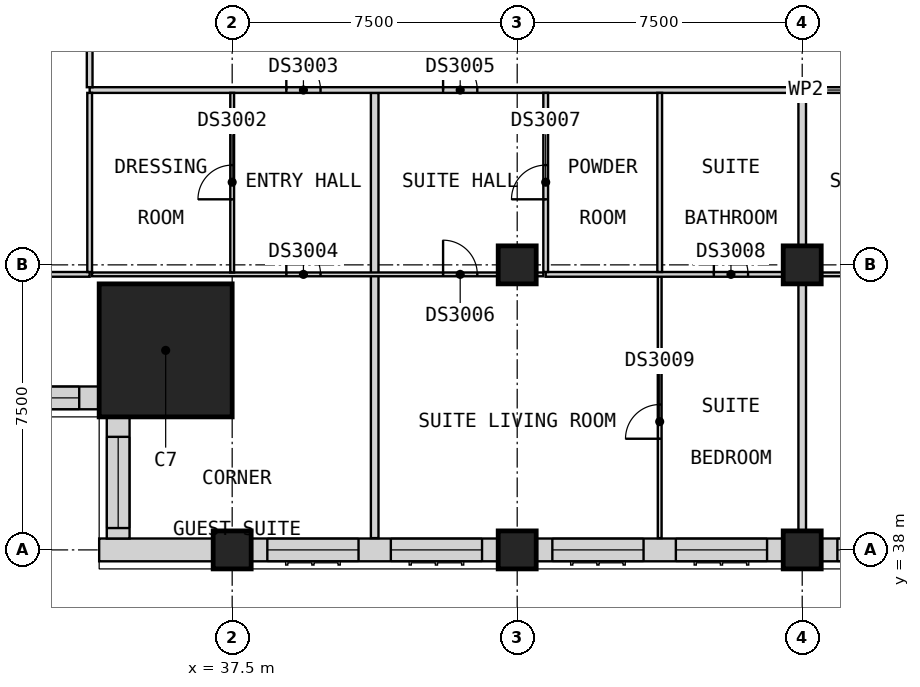
"""IFC4 building model, lengths in metres.
Left out: names, types, materials, properties, quantities, classifications, styles, units other than length and angle.
Written with IfcOpenShell. Run it as: python <this file> out.ifc"""

import sys

from ifc_helpers import new_model, si_unit, direction, frame, frame_2d, origin, origin_2d, place, context, subcontext, project, spatial, rectangle, extrude, element, fill, save


model = new_model("IFC4")
c1 = context("Model", 3, precision=1e-05, world=origin(), true_north=direction((0.0, 1.0)))
c2 = subcontext(c1, "Body", "Model", "MODEL_VIEW")
j1 = project(units=[si_unit("LENGTHUNIT", "METRE"), si_unit("PLANEANGLEUNIT", "RADIAN")], contexts=[c1])
p1 = place(None, origin())
s1 = spatial("IfcSite", under=j1, at=p1, CompositionType="ELEMENT")
p2 = place(p1, origin())
s2 = spatial("IfcBuilding", under=s1, at=p2, CompositionType="ELEMENT")
p3 = place(p2, frame((0.0, 0.0, 137.4)))
s3 = spatial("IfcBuildingStorey", under=s2, at=p3, CompositionType="ELEMENT", Elevation=137.4)
for number, where, z_axis, x_axis in (
    (1, (37.5, 38.0, 0.0), (0.0, 0.0, 1.0), (1.0, 0.0, 0.0)),
    (2, (45.0, 38.0, 0.0), (0.0, 0.0, 1.0), (1.0, 0.0, 0.0)),
    (3, (45.0, 45.5, 0.0), (0.0, 0.0, 1.0), (1.0, 0.0, 0.0)),
    (4, (52.5, 38.0, 0.0), (0.0, 0.0, 1.0), (1.0, 0.0, 0.0)),
    (5, (52.5, 45.5, 0.0), (0.0, 0.0, 1.0), (1.0, 0.0, 0.0)),
):
    element("IfcColumn", number, at=place(p3, frame(where, z_axis=z_axis, x_axis=x_axis)), inside=s3, PredefinedType="COLUMN", context=c2, shape_type="SweptSolid", body=[
        extrude(rectangle(XDim=1.0, YDim=1.0, at=origin_2d()), origin(), (0.0, 0.0, 1.0), 3.6),
    ])
p4 = place(p3, frame((35.75, 43.25, 0.0), z_axis=(0.0, 0.0, 1.0), x_axis=(1.0, 0.0, 0.0)))
e6 = element("IfcColumn", 6, at=p4, inside=s3, PredefinedType="COLUMN", context=c2, shape_type="SweptSolid", body=[
    extrude(rectangle(XDim=3.5, YDim=3.5, at=origin_2d()), origin(), (0.0, 0.0, 1.0), 3.6),
])
p5 = place(p3, frame((34.0, 38.0, 0.0), z_axis=(0.0, 0.0, 1.0), x_axis=(1.0, 0.0, 0.0)))
e7 = element("IfcWall", 7, at=p5, inside=s3, PredefinedType="SOLIDWALL", context=c2, shape_type="SweptSolid", body=[
    extrude(rectangle(XDim=3.0, YDim=0.6, at=frame_2d((1.5, 0.0))), origin(), (0.0, 0.0, 1.0), 3.35),
])
p6 = place(p3, frame((38.0, 38.0, 0.0), z_axis=(0.0, 0.0, 1.0), x_axis=(1.0, 0.0, 0.0)))
e8 = element("IfcWall", 8, at=p6, inside=s3, PredefinedType="SOLIDWALL", context=c2, shape_type="SweptSolid", body=[
    extrude(rectangle(XDim=6.5, YDim=0.6, at=frame_2d((3.25, 0.0))), origin(), (0.0, 0.0, 1.0), 2.85),
])
p7 = place(p6, frame((0.425, 0.0, 0.8)))
e9 = element("IfcOpeningElement", 9, at=p7, cuts=e8, PredefinedType="OPENING", context=c2, shape_type="SweptSolid", body=[
    extrude(rectangle(XDim=2.4, YDim=1.8, at=frame_2d((1.2, 0.9))), frame((0.0, 0.31, 0.0), z_axis=(0.0, -1.0, 0.0), x_axis=(1.0, 0.0, 0.0)), (0.0, 0.0, 1.0), 0.62),
])
p8 = place(p6, frame((3.675, 0.0, 0.8)))
e10 = element("IfcOpeningElement", 10, at=p8, cuts=e8, PredefinedType="OPENING", context=c2, shape_type="SweptSolid", body=[
    extrude(rectangle(XDim=2.4, YDim=1.8, at=frame_2d((1.2, 0.9))), frame((0.0, 0.31, 0.0), z_axis=(0.0, -1.0, 0.0), x_axis=(1.0, 0.0, 0.0)), (0.0, 0.0, 1.0), 0.62),
])
p9 = place(p3, frame((45.5, 38.0, 0.0), z_axis=(0.0, 0.0, 1.0), x_axis=(1.0, 0.0, 0.0)))
e11 = element("IfcWall", 11, at=p9, inside=s3, PredefinedType="SOLIDWALL", context=c2, shape_type="SweptSolid", body=[
    extrude(rectangle(XDim=6.5, YDim=0.6, at=frame_2d((3.25, 0.0))), origin(), (0.0, 0.0, 1.0), 2.85),
])
p10 = place(p9, frame((0.425, 0.0, 0.8)))
e12 = element("IfcOpeningElement", 12, at=p10, cuts=e11, PredefinedType="OPENING", context=c2, shape_type="SweptSolid", body=[
    extrude(rectangle(XDim=2.4, YDim=1.8, at=frame_2d((1.2, 0.9))), frame((0.0, 0.31, 0.0), z_axis=(0.0, -1.0, 0.0), x_axis=(1.0, 0.0, 0.0)), (0.0, 0.0, 1.0), 0.62),
])
p11 = place(p9, frame((3.675, 0.0, 0.8)))
e13 = element("IfcOpeningElement", 13, at=p11, cuts=e11, PredefinedType="OPENING", context=c2, shape_type="SweptSolid", body=[
    extrude(rectangle(XDim=2.4, YDim=1.8, at=frame_2d((1.2, 0.9))), frame((0.0, 0.31, 0.0), z_axis=(0.0, -1.0, 0.0), x_axis=(1.0, 0.0, 0.0)), (0.0, 0.0, 1.0), 0.62),
])
p12 = place(p3, frame((53.0, 38.0, 0.0), z_axis=(0.0, 0.0, 1.0), x_axis=(1.0, 0.0, 0.0)))
e14 = element("IfcWall", 14, at=p12, inside=s3, PredefinedType="SOLIDWALL", context=c2, shape_type="SweptSolid", body=[
    extrude(rectangle(XDim=6.5, YDim=0.6, at=frame_2d((3.25, 0.0))), origin(), (0.0, 0.0, 1.0), 2.85),
])
p13 = place(p12, frame((0.425, 0.0, 0.8)))
e15 = element("IfcOpeningElement", 15, at=p13, cuts=e14, PredefinedType="OPENING", context=c2, shape_type="SweptSolid", body=[
    extrude(rectangle(XDim=2.4, YDim=1.8, at=frame_2d((1.2, 0.9))), frame((0.0, 0.31, 0.0), z_axis=(0.0, -1.0, 0.0), x_axis=(1.0, 0.0, 0.0)), (0.0, 0.0, 1.0), 0.62),
])
p14 = place(p12, frame((3.675, 0.0, 0.8)))
e16 = element("IfcOpeningElement", 16, at=p14, cuts=e14, PredefinedType="OPENING", context=c2, shape_type="SweptSolid", body=[
    extrude(rectangle(XDim=2.4, YDim=1.8, at=frame_2d((1.2, 0.9))), frame((0.0, 0.31, 0.0), z_axis=(0.0, -1.0, 0.0), x_axis=(1.0, 0.0, 0.0)), (0.0, 0.0, 1.0), 0.62),
])
p15 = place(p3, frame((30.8, 42.0, 0.0), z_axis=(0.0, 0.0, 1.0), x_axis=(1.0, 0.0, 0.0)))
e17 = element("IfcWall", 17, at=p15, inside=s3, PredefinedType="SOLIDWALL", context=c2, shape_type="SweptSolid", body=[
    extrude(rectangle(XDim=3.2, YDim=0.6, at=frame_2d((1.6, 0.0))), origin(), (0.0, 0.0, 1.0), 3.35),
])
p16 = place(p15, frame((0.275, 0.0, 0.8)))
e18 = element("IfcOpeningElement", 18, at=p16, cuts=e17, PredefinedType="OPENING", context=c2, shape_type="SweptSolid", body=[
    extrude(rectangle(XDim=2.4, YDim=1.8, at=frame_2d((1.2, 0.9))), frame((0.0, 0.31, 0.0), z_axis=(0.0, -1.0, 0.0), x_axis=(1.0, 0.0, 0.0)), (0.0, 0.0, 1.0), 0.62),
])
p17 = place(p3, frame((34.5, 41.5, 0.0), z_axis=(0.0, 0.0, 1.0), x_axis=(0.0, -1.0, 0.0)))
e19 = element("IfcWall", 19, at=p17, inside=s3, PredefinedType="SOLIDWALL", context=c2, shape_type="SweptSolid", body=[
    extrude(rectangle(XDim=3.2, YDim=0.6, at=frame_2d((1.6, 0.0))), origin(), (0.0, 0.0, 1.0), 3.35),
])
p18 = place(p17, frame((0.525, 0.0, 0.8)))
e20 = element("IfcOpeningElement", 20, at=p18, cuts=e19, PredefinedType="OPENING", context=c2, shape_type="SweptSolid", body=[
    extrude(rectangle(XDim=2.4, YDim=1.8, at=frame_2d((1.2, 0.9))), frame((0.0, 0.31, 0.0), z_axis=(0.0, -1.0, 0.0), x_axis=(1.0, 0.0, 0.0)), (0.0, 0.0, 1.0), 0.62),
])
p19 = place(p3, frame((41.25, 38.31, 0.0), z_axis=(0.0, 0.0, 1.0), x_axis=(0.0, 1.0, 0.0)))
e21 = element("IfcWall", 21, at=p19, inside=s3, PredefinedType="PARTITIONING", context=c2, shape_type="SweptSolid", body=[
    extrude(rectangle(XDim=11.715, YDim=0.2, at=frame_2d((5.857, 0.0))), origin(), (0.0, 0.0, 1.0), 3.35),
])
p20 = place(p3, frame((52.5, 37.5, 0.0), z_axis=(0.0, 0.0, 1.0), x_axis=(0.0, 1.0, 0.0)))
e22 = element("IfcWall", 22, at=p20, inside=s3, PredefinedType="PARTITIONING", context=c2, shape_type="SweptSolid", body=[
    extrude(rectangle(XDim=12.525, YDim=0.2, at=frame_2d((6.262, 0.0))), origin(), (0.0, 0.0, 1.0), 3.35),
])
p21 = place(p3, frame((33.75, 50.1, 0.0), z_axis=(0.0, 0.0, 1.0), x_axis=(1.0, 0.0, 0.0)))
e23 = element("IfcWall", 23, at=p21, inside=s3, PredefinedType="PARTITIONING", context=c2, shape_type="SweptSolid", body=[
    extrude(rectangle(XDim=39.9, YDim=0.15, at=frame_2d((19.95, 0.0))), origin(), (0.0, 0.0, 1.0), 3.35),
])
p22 = place(p21, frame((5.175, 0.0, 0.0)))
e24 = element("IfcOpeningElement", 24, at=p22, cuts=e23, PredefinedType="OPENING", context=c2, shape_type="SweptSolid", body=[
    extrude(rectangle(XDim=0.9, YDim=2.1, at=frame_2d((0.45, 1.05))), frame((0.0, 0.085, 0.0), z_axis=(0.0, -1.0, 0.0), x_axis=(1.0, 0.0, 0.0)), (0.0, 0.0, 1.0), 0.17),
])
p23 = place(p21, frame((9.3, 0.0, 0.0)))
e25 = element("IfcOpeningElement", 25, at=p23, cuts=e23, PredefinedType="OPENING", context=c2, shape_type="SweptSolid", body=[
    extrude(rectangle(XDim=0.9, YDim=2.1, at=frame_2d((0.45, 1.05))), frame((0.0, 0.085, 0.0), z_axis=(0.0, -1.0, 0.0), x_axis=(1.0, 0.0, 0.0)), (0.0, 0.0, 1.0), 0.17),
])
p24 = place(p21, frame((20.55, 0.0, 0.0)))
e26 = element("IfcOpeningElement", 26, at=p24, cuts=e23, PredefinedType="OPENING", context=c2, shape_type="SweptSolid", body=[
    extrude(rectangle(XDim=0.9, YDim=2.1, at=frame_2d((0.45, 1.05))), frame((0.0, 0.085, 0.0), z_axis=(0.0, -1.0, 0.0), x_axis=(1.0, 0.0, 0.0)), (0.0, 0.0, 1.0), 0.17),
])
p25 = place(p21, frame((35.55, 0.0, 0.0)))
e27 = element("IfcOpeningElement", 27, at=p25, cuts=e23, PredefinedType="OPENING", context=c2, shape_type="SweptSolid", body=[
    extrude(rectangle(XDim=0.9, YDim=2.1, at=frame_2d((0.45, 1.05))), frame((0.0, 0.085, 0.0), z_axis=(0.0, -1.0, 0.0), x_axis=(1.0, 0.0, 0.0)), (0.0, 0.0, 1.0), 0.17),
])
p26 = place(p21, frame((38.25, 0.0, 0.0)))
e28 = element("IfcOpeningElement", 28, at=p26, cuts=e23, PredefinedType="OPENING", context=c2, shape_type="SweptSolid", body=[
    extrude(rectangle(XDim=0.9, YDim=2.1, at=frame_2d((0.45, 1.05))), frame((0.0, 0.085, 0.0), z_axis=(0.0, -1.0, 0.0), x_axis=(1.0, 0.0, 0.0)), (0.0, 0.0, 1.0), 0.17),
])
p27 = place(p3, frame((33.75, 50.175, 0.0), z_axis=(0.0, 0.0, 1.0), x_axis=(0.0, 1.0, 0.0)))
e29 = element("IfcWall", 29, at=p27, inside=s3, PredefinedType="PARTITIONING", context=c2, shape_type="SweptSolid", body=[
    extrude(rectangle(XDim=2.225, YDim=0.15, at=frame_2d((1.112, 0.0))), origin(), (0.0, 0.0, 1.0), 3.35),
])
p28 = place(p3, frame((33.812, 45.25, 0.0), z_axis=(0.0, 0.0, 1.0), x_axis=(1.0, 0.0, 0.0)))
e30 = element("IfcWall", 30, at=p28, inside=s3, PredefinedType="PARTITIONING", context=c2, shape_type="SweptSolid", body=[
    extrude(rectangle(XDim=11.875, YDim=0.1, at=frame_2d((5.938, 0.0))), origin(), (0.0, 0.0, 1.0), 3.35),
])
p29 = place(p28, frame((5.113, 0.0, 0.0)))
e31 = element("IfcOpeningElement", 31, at=p29, cuts=e30, PredefinedType="OPENING", context=c2, shape_type="SweptSolid", body=[
    extrude(rectangle(XDim=0.9, YDim=2.1, at=frame_2d((0.45, 1.05))), frame((0.0, 0.06, 0.0), z_axis=(0.0, -1.0, 0.0), x_axis=(1.0, 0.0, 0.0)), (0.0, 0.0, 1.0), 0.12),
])
p30 = place(p28, frame((9.238, 0.0, 0.0)))
e32 = element("IfcOpeningElement", 32, at=p30, cuts=e30, PredefinedType="OPENING", context=c2, shape_type="SweptSolid", body=[
    extrude(rectangle(XDim=0.9, YDim=2.1, at=frame_2d((0.45, 1.05))), frame((0.0, 0.06, 0.0), z_axis=(0.0, -1.0, 0.0), x_axis=(1.0, 0.0, 0.0)), (0.0, 0.0, 1.0), 0.12),
])
p31 = place(p3, frame((52.6, 45.25, 0.0), z_axis=(0.0, 0.0, 1.0), x_axis=(1.0, 0.0, 0.0)))
e33 = element("IfcWall", 33, at=p31, inside=s3, PredefinedType="PARTITIONING", context=c2, shape_type="SweptSolid", body=[
    extrude(rectangle(XDim=4.337, YDim=0.1, at=frame_2d((2.169, 0.0))), origin(), (0.0, 0.0, 1.0), 3.35),
])
p32 = place(p31, frame((1.7, 0.0, 0.0)))
e34 = element("IfcOpeningElement", 34, at=p32, cuts=e33, PredefinedType="OPENING", context=c2, shape_type="SweptSolid", body=[
    extrude(rectangle(XDim=0.9, YDim=2.1, at=frame_2d((0.45, 1.05))), frame((0.0, 0.06, 0.0), z_axis=(0.0, -1.0, 0.0), x_axis=(1.0, 0.0, 0.0)), (0.0, 0.0, 1.0), 0.12),
])
p33 = place(p3, frame((37.5, 45.3, 0.0), z_axis=(0.0, 0.0, 1.0), x_axis=(0.0, 1.0, 0.0)))
e35 = element("IfcWall", 35, at=p33, inside=s3, PredefinedType="PARTITIONING", context=c2, shape_type="SweptSolid", body=[
    extrude(rectangle(XDim=4.725, YDim=0.1, at=frame_2d((2.362, 0.0))), origin(), (0.0, 0.0, 1.0), 3.35),
])
p34 = place(p33, frame((1.925, 0.0, 0.0)))
e36 = element("IfcOpeningElement", 36, at=p34, cuts=e35, PredefinedType="OPENING", context=c2, shape_type="SweptSolid", body=[
    extrude(rectangle(XDim=0.9, YDim=2.1, at=frame_2d((0.45, 1.05))), frame((0.0, 0.06, 0.0), z_axis=(0.0, -1.0, 0.0), x_axis=(1.0, 0.0, 0.0)), (0.0, 0.0, 1.0), 0.12),
])
p35 = place(p3, frame((48.75, 38.31, 0.0), z_axis=(0.0, 0.0, 1.0), x_axis=(0.0, 1.0, 0.0)))
e37 = element("IfcWall", 37, at=p35, inside=s3, PredefinedType="PARTITIONING", context=c2, shape_type="SweptSolid", body=[
    extrude(rectangle(XDim=6.877, YDim=0.1, at=frame_2d((3.439, 0.0))), origin(), (0.0, 0.0, 1.0), 3.35),
])
p36 = place(p35, frame((2.615, 0.0, 0.0)))
e38 = element("IfcOpeningElement", 38, at=p36, cuts=e37, PredefinedType="OPENING", context=c2, shape_type="SweptSolid", body=[
    extrude(rectangle(XDim=0.9, YDim=2.1, at=frame_2d((0.45, 1.05))), frame((0.0, 0.06, 0.0), z_axis=(0.0, -1.0, 0.0), x_axis=(1.0, 0.0, 0.0)), (0.0, 0.0, 1.0), 0.12),
])
p37 = place(p3, frame((30.0, 45.25, 0.0), z_axis=(0.0, 0.0, 1.0), x_axis=(1.0, 0.0, 0.0)))
e39 = element("IfcWall", 39, at=p37, inside=s3, PredefinedType="PARTITIONING", context=c2, shape_type="SweptSolid", body=[
    extrude(rectangle(XDim=3.75, YDim=0.125, at=frame_2d((1.875, 0.0))), origin(), (0.0, 0.0, 1.0), 3.35),
])
p38 = place(p37, frame((1.425, 0.0, 0.0)))
e40 = element("IfcOpeningElement", 40, at=p38, cuts=e39, PredefinedType="OPENING", context=c2, shape_type="SweptSolid", body=[
    extrude(rectangle(XDim=0.9, YDim=2.1, at=frame_2d((0.45, 1.05))), frame((0.0, 0.073, 0.0), z_axis=(0.0, -1.0, 0.0), x_axis=(1.0, 0.0, 0.0)), (0.0, 0.0, 1.0), 0.145),
])
p39 = place(p3, frame((45.75, 45.25, 0.0), z_axis=(0.0, 0.0, 1.0), x_axis=(1.0, 0.0, 0.0)))
e41 = element("IfcWall", 41, at=p39, inside=s3, PredefinedType="PARTITIONING", context=c2, shape_type="SweptSolid", body=[
    extrude(rectangle(XDim=6.65, YDim=0.125, at=frame_2d((3.325, 0.0))), origin(), (0.0, 0.0, 1.0), 3.35),
])
p40 = place(p39, frame((4.425, 0.0, 0.0)))
e42 = element("IfcOpeningElement", 42, at=p40, cuts=e41, PredefinedType="OPENING", context=c2, shape_type="SweptSolid", body=[
    extrude(rectangle(XDim=0.9, YDim=2.1, at=frame_2d((0.45, 1.05))), frame((0.0, 0.073, 0.0), z_axis=(0.0, -1.0, 0.0), x_axis=(1.0, 0.0, 0.0)), (0.0, 0.0, 1.0), 0.145),
])
p41 = place(p3, frame((33.75, 45.312, 0.0), z_axis=(0.0, 0.0, 1.0), x_axis=(0.0, 1.0, 0.0)))
e43 = element("IfcWall", 43, at=p41, inside=s3, PredefinedType="PARTITIONING", context=c2, shape_type="SweptSolid", body=[
    extrude(rectangle(XDim=4.712, YDim=0.125, at=frame_2d((2.356, 0.0))), origin(), (0.0, 0.0, 1.0), 3.35),
])
p42 = place(p3, frame((45.75, 45.312, 0.0), z_axis=(0.0, 0.0, 1.0), x_axis=(0.0, 1.0, 0.0)))
e44 = element("IfcWall", 44, at=p42, inside=s3, PredefinedType="PARTITIONING", context=c2, shape_type="SweptSolid", body=[
    extrude(rectangle(XDim=4.712, YDim=0.125, at=frame_2d((2.356, 0.0))), origin(), (0.0, 0.0, 1.0), 3.35),
])
p43 = place(p42, frame((1.913, 0.0, 0.0)))
e45 = element("IfcOpeningElement", 45, at=p43, cuts=e44, PredefinedType="OPENING", context=c2, shape_type="SweptSolid", body=[
    extrude(rectangle(XDim=0.9, YDim=2.1, at=frame_2d((0.45, 1.05))), frame((0.0, 0.073, 0.0), z_axis=(0.0, -1.0, 0.0), x_axis=(1.0, 0.0, 0.0)), (0.0, 0.0, 1.0), 0.145),
])
p44 = place(p3, frame((48.75, 45.312, 0.0), z_axis=(0.0, 0.0, 1.0), x_axis=(0.0, 1.0, 0.0)))
e46 = element("IfcWall", 46, at=p44, inside=s3, PredefinedType="PARTITIONING", context=c2, shape_type="SweptSolid", body=[
    extrude(rectangle(XDim=4.712, YDim=0.125, at=frame_2d((2.356, 0.0))), origin(), (0.0, 0.0, 1.0), 3.35),
])
p45 = place(p7, origin())
e47 = element("IfcWindow", 47, at=p45, inside=s3, PartitioningType="SINGLE_PANEL", PredefinedType="WINDOW", context=c2, shape_type="SweptSolid", body=[
    extrude(rectangle(XDim=2.4, YDim=1.8, at=frame_2d((1.2, 0.9))), frame((0.0, -0.07, 0.0), z_axis=(0.0, -1.0, 0.0), x_axis=(1.0, 0.0, 0.0)), (0.0, 0.0, 1.0), 0.06),
])
fill(e9, e47)
p46 = place(p8, origin())
e48 = element("IfcWindow", 48, at=p46, inside=s3, PartitioningType="SINGLE_PANEL", PredefinedType="WINDOW", context=c2, shape_type="SweptSolid", body=[
    extrude(rectangle(XDim=2.4, YDim=1.8, at=frame_2d((1.2, 0.9))), frame((0.0, -0.07, 0.0), z_axis=(0.0, -1.0, 0.0), x_axis=(1.0, 0.0, 0.0)), (0.0, 0.0, 1.0), 0.06),
])
fill(e10, e48)
p47 = place(p10, origin())
e49 = element("IfcWindow", 49, at=p47, inside=s3, PartitioningType="SINGLE_PANEL", PredefinedType="WINDOW", context=c2, shape_type="SweptSolid", body=[
    extrude(rectangle(XDim=2.4, YDim=1.8, at=frame_2d((1.2, 0.9))), frame((0.0, -0.07, 0.0), z_axis=(0.0, -1.0, 0.0), x_axis=(1.0, 0.0, 0.0)), (0.0, 0.0, 1.0), 0.06),
])
fill(e12, e49)
p48 = place(p11, origin())
e50 = element("IfcWindow", 50, at=p48, inside=s3, PartitioningType="SINGLE_PANEL", PredefinedType="WINDOW", context=c2, shape_type="SweptSolid", body=[
    extrude(rectangle(XDim=2.4, YDim=1.8, at=frame_2d((1.2, 0.9))), frame((0.0, -0.07, 0.0), z_axis=(0.0, -1.0, 0.0), x_axis=(1.0, 0.0, 0.0)), (0.0, 0.0, 1.0), 0.06),
])
fill(e13, e50)
p49 = place(p13, origin())
e51 = element("IfcWindow", 51, at=p49, inside=s3, PartitioningType="SINGLE_PANEL", PredefinedType="WINDOW", context=c2, shape_type="SweptSolid", body=[
    extrude(rectangle(XDim=2.4, YDim=1.8, at=frame_2d((1.2, 0.9))), frame((0.0, -0.07, 0.0), z_axis=(0.0, -1.0, 0.0), x_axis=(1.0, 0.0, 0.0)), (0.0, 0.0, 1.0), 0.06),
])
fill(e15, e51)
p50 = place(p16, origin())
e52 = element("IfcWindow", 52, at=p50, inside=s3, PartitioningType="SINGLE_PANEL", PredefinedType="WINDOW", context=c2, shape_type="SweptSolid", body=[
    extrude(rectangle(XDim=2.4, YDim=1.8, at=frame_2d((1.2, 0.9))), frame((0.0, -0.07, 0.0), z_axis=(0.0, -1.0, 0.0), x_axis=(1.0, 0.0, 0.0)), (0.0, 0.0, 1.0), 0.06),
])
fill(e18, e52)
p51 = place(p18, origin())
e53 = element("IfcWindow", 53, at=p51, inside=s3, PartitioningType="SINGLE_PANEL", PredefinedType="WINDOW", context=c2, shape_type="SweptSolid", body=[
    extrude(rectangle(XDim=2.4, YDim=1.8, at=frame_2d((1.2, 0.9))), frame((0.0, -0.07, 0.0), z_axis=(0.0, -1.0, 0.0), x_axis=(1.0, 0.0, 0.0)), (0.0, 0.0, 1.0), 0.06),
])
fill(e20, e53)
p52 = place(p34, origin())
e54 = element("IfcDoor", 54, at=p52, inside=s3, OperationType="SINGLE_SWING_RIGHT", PredefinedType="DOOR", context=c2, shape_type="SweptSolid", body=[
    extrude(rectangle(XDim=0.9, YDim=2.1, at=frame_2d((0.45, 1.05))), frame((0.0, 0.025, 0.0), z_axis=(0.0, -1.0, 0.0), x_axis=(1.0, 0.0, 0.0)), (0.0, 0.0, 1.0), 0.05),
])
fill(e36, e54)
p53 = place(p22, origin())
e55 = element("IfcDoor", 55, at=p53, inside=s3, OperationType="SINGLE_SWING_RIGHT", PredefinedType="DOOR", context=c2, shape_type="SweptSolid", body=[
    extrude(rectangle(XDim=0.9, YDim=2.1, at=frame_2d((0.45, 1.05))), frame((0.0, 0.025, 0.0), z_axis=(0.0, -1.0, 0.0), x_axis=(1.0, 0.0, 0.0)), (0.0, 0.0, 1.0), 0.05),
])
fill(e24, e55)
p54 = place(p29, origin())
e56 = element("IfcDoor", 56, at=p54, inside=s3, OperationType="SINGLE_SWING_LEFT", PredefinedType="DOOR", context=c2, shape_type="SweptSolid", body=[
    extrude(rectangle(XDim=0.9, YDim=2.1, at=frame_2d((0.45, 1.05))), frame((0.0, 0.025, 0.0), z_axis=(0.0, -1.0, 0.0), x_axis=(1.0, 0.0, 0.0)), (0.0, 0.0, 1.0), 0.05),
])
fill(e31, e56)
p55 = place(p23, origin())
e57 = element("IfcDoor", 57, at=p55, inside=s3, OperationType="SINGLE_SWING_RIGHT", PredefinedType="DOOR", context=c2, shape_type="SweptSolid", body=[
    extrude(rectangle(XDim=0.9, YDim=2.1, at=frame_2d((0.45, 1.05))), frame((0.0, 0.025, 0.0), z_axis=(0.0, -1.0, 0.0), x_axis=(1.0, 0.0, 0.0)), (0.0, 0.0, 1.0), 0.05),
])
fill(e25, e57)
p56 = place(p30, origin())
e58 = element("IfcDoor", 58, at=p56, inside=s3, OperationType="SINGLE_SWING_LEFT", PredefinedType="DOOR", context=c2, shape_type="SweptSolid", body=[
    extrude(rectangle(XDim=0.9, YDim=2.1, at=frame_2d((0.45, 1.05))), frame((0.0, 0.025, 0.0), z_axis=(0.0, -1.0, 0.0), x_axis=(1.0, 0.0, 0.0)), (0.0, 0.0, 1.0), 0.05),
])
fill(e32, e58)
p57 = place(p43, origin())
e59 = element("IfcDoor", 59, at=p57, inside=s3, OperationType="SINGLE_SWING_LEFT", PredefinedType="DOOR", context=c2, shape_type="SweptSolid", body=[
    extrude(rectangle(XDim=0.9, YDim=2.1, at=frame_2d((0.45, 1.05))), frame((0.0, 0.025, 0.0), z_axis=(0.0, -1.0, 0.0), x_axis=(1.0, 0.0, 0.0)), (0.0, 0.0, 1.0), 0.05),
])
fill(e45, e59)
p58 = place(p40, origin())
e60 = element("IfcDoor", 60, at=p58, inside=s3, OperationType="SINGLE_SWING_LEFT", PredefinedType="DOOR", context=c2, shape_type="SweptSolid", body=[
    extrude(rectangle(XDim=0.9, YDim=2.1, at=frame_2d((0.45, 1.05))), frame((0.0, 0.025, 0.0), z_axis=(0.0, -1.0, 0.0), x_axis=(1.0, 0.0, 0.0)), (0.0, 0.0, 1.0), 0.05),
])
fill(e42, e60)
p59 = place(p36, origin())
e61 = element("IfcDoor", 61, at=p59, inside=s3, OperationType="SINGLE_SWING_LEFT", PredefinedType="DOOR", context=c2, shape_type="SweptSolid", body=[
    extrude(rectangle(XDim=0.9, YDim=2.1, at=frame_2d((0.45, 1.05))), frame((0.0, 0.025, 0.0), z_axis=(0.0, -1.0, 0.0), x_axis=(1.0, 0.0, 0.0)), (0.0, 0.0, 1.0), 0.05),
])
fill(e38, e61)
save(model, sys.argv[1])
